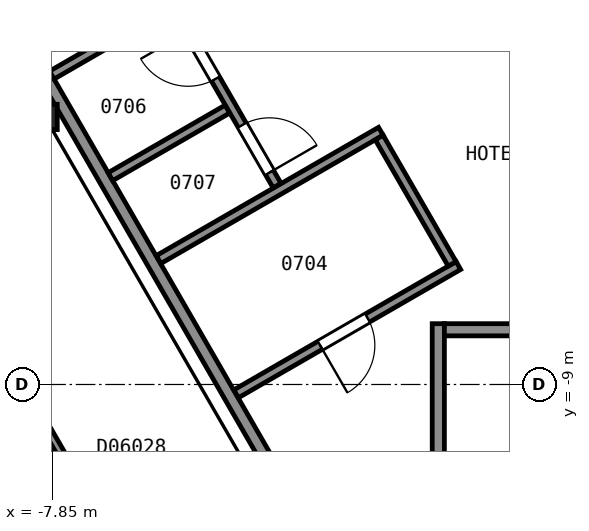
"""IFC4 building model, lengths in metres.
Left out: names, types, materials, properties, quantities, classifications, styles, units other than length and angle.
Written with IfcOpenShell. Run it as: python <this file> out.ifc"""

import sys

from ifc_helpers import new_model, si_unit, direction, frame, frame_2d, origin, origin_2d, place, context, subcontext, project, spatial, rectangle, i_section, extrude, element, fill, save


model = new_model("IFC4")
c1 = context("Model", 3, precision=1e-05, world=origin(), true_north=direction((0.0, 1.0)))
c2 = subcontext(c1, "Body", "Model", "MODEL_VIEW")
j1 = project(units=[si_unit("LENGTHUNIT", "METRE"), si_unit("PLANEANGLEUNIT", "RADIAN")], contexts=[c1])
p1 = place(None, origin())
s1 = spatial("IfcSite", under=j1, at=p1, CompositionType="ELEMENT")
p2 = place(p1, origin())
s2 = spatial("IfcBuilding", under=s1, at=p2, CompositionType="ELEMENT")
p3 = place(p2, frame((0.0, 0.0, 40.4)))
s3 = spatial("IfcBuildingStorey", under=s2, at=p3, CompositionType="ELEMENT", Elevation=40.4)
p4 = place(p3, frame((-7.97, -4.6, 0.0), z_axis=(0.0, 0.0, 1.0), x_axis=(1.0, 0.0, 0.0)))
e1 = element("IfcColumn", 1, at=p4, inside=s3, PredefinedType="COLUMN", context=c2, shape_type="SweptSolid", body=[
    extrude(i_section(OverallWidth=0.406, OverallDepth=0.417, WebThickness=0.03, FlangeThickness=0.048, FilletRadius=0.015, at=origin_2d()), origin(), (0.0, 0.0, 1.0), 3.6),
])
p5 = place(p3, frame((-1.5, -8.0, 0.0), z_axis=(0.0, 0.0, 1.0), x_axis=(0.0, -1.0, 0.0)))
e2 = element("IfcWall", 2, at=p5, inside=s3, PredefinedType="PARTITIONING", context=c2, shape_type="SweptSolid", body=[
    extrude(rectangle(XDim=12.0, YDim=0.2, at=frame_2d((6.0, 0.0))), origin(), (0.0, 0.0, 1.0), 3.35),
])
p6 = place(p3, frame((-1.4, -8.1, 0.0), z_axis=(0.0, 0.0, 1.0), x_axis=(1.0, 0.0, 0.0)))
e3 = element("IfcWall", 3, at=p6, inside=s3, PredefinedType="PARTITIONING", context=c2, shape_type="SweptSolid", body=[
    extrude(rectangle(XDim=2.8, YDim=0.2, at=frame_2d((1.4, 0.0))), origin(), (0.0, 0.0, 1.0), 3.35),
])
p7 = place(p3, frame((-13.664, 5.946, 0.0), z_axis=(0.0, 0.0, 1.0), x_axis=(0.499994327219, -0.866028678941, 0.0)))
e4 = element("IfcWall", 4, at=p7, inside=s3, PredefinedType="PARTITIONING", context=c2, shape_type="SweptSolid", body=[
    extrude(rectangle(XDim=23.968, YDim=0.2, at=frame_2d((11.984, 0.0))), origin(), (0.0, 0.0, 1.0), 3.35),
])
p8 = place(p3, frame((-7.856, -3.912, 0.0), z_axis=(0.0, 0.0, 1.0), x_axis=(0.865971748, 0.500092923031, 0.0)))
e5 = element("IfcWall", 5, at=p8, inside=s3, PredefinedType="PARTITIONING", context=c2, shape_type="SweptSolid", body=[
    extrude(rectangle(XDim=2.225, YDim=0.15, at=frame_2d((1.112, 0.0))), origin(), (0.0, 0.0, 1.0), 3.35),
])
p9 = place(p3, frame((-6.892, -5.582, 0.0), z_axis=(0.0, 0.0, 1.0), x_axis=(0.865944298464, 0.500140452231, 0.0)))
e6 = element("IfcWall", 6, at=p9, inside=s3, PredefinedType="PARTITIONING", context=c2, shape_type="SweptSolid", body=[
    extrude(rectangle(XDim=2.224, YDim=0.15, at=frame_2d((1.112, 0.0))), origin(), (0.0, 0.0, 1.0), 3.35),
])
p10 = place(p3, frame((-6.1, -6.946, 0.0), z_axis=(0.0, 0.0, 1.0), x_axis=(0.866038200431, 0.499977834903, 0.0)))
e7 = element("IfcWall", 7, at=p10, inside=s3, PredefinedType="PARTITIONING", context=c2, shape_type="SweptSolid", body=[
    extrude(rectangle(XDim=4.22, YDim=0.15, at=frame_2d((2.11, 0.0))), origin(), (0.0, 0.0, 1.0), 3.35),
])
p11 = place(p3, frame((-4.152, -5.729, 0.0), z_axis=(0.0, 0.0, 1.0), x_axis=(-0.500024287448, 0.866011380966, 0.0)))
e8 = element("IfcWall", 8, at=p11, inside=s3, PredefinedType="PARTITIONING", context=c2, shape_type="SweptSolid", body=[
    extrude(rectangle(XDim=3.501, YDim=0.15, at=frame_2d((1.75, 0.0))), origin(), (0.0, 0.0, 1.0), 3.35),
])
p12 = place(p11, frame((2.026, 0.0, 0.0)))
e9 = element("IfcOpeningElement", 9, at=p12, cuts=e8, PredefinedType="OPENING", context=c2, shape_type="SweptSolid", body=[
    extrude(rectangle(XDim=0.9, YDim=2.1, at=frame_2d((0.45, 1.05))), frame((0.0, 0.085, 0.0), z_axis=(0.0, -1.0, 0.0), x_axis=(1.0, 0.0, 0.0)), (0.0, 0.0, 1.0), 0.17),
])
p13 = place(p11, frame((0.248, 0.0, 0.0)))
e10 = element("IfcOpeningElement", 10, at=p13, cuts=e8, PredefinedType="OPENING", context=c2, shape_type="SweptSolid", body=[
    extrude(rectangle(XDim=0.9, YDim=2.1, at=frame_2d((0.45, 1.05))), frame((0.0, 0.085, 0.0), z_axis=(0.0, -1.0, 0.0), x_axis=(1.0, 0.0, 0.0)), (0.0, 0.0, 1.0), 0.17),
])
p14 = place(p3, frame((-4.825, -9.154, 0.0), z_axis=(0.0, 0.0, 1.0), x_axis=(0.866023738697, 0.500002884005, 0.0)))
e11 = element("IfcWall", 11, at=p14, inside=s3, PredefinedType="PARTITIONING", context=c2, shape_type="SweptSolid", body=[
    extrude(rectangle(XDim=4.22, YDim=0.15, at=frame_2d((2.11, 0.0))), origin(), (0.0, 0.0, 1.0), 3.35),
])
p15 = place(p14, frame((1.595, 0.0, 0.0)))
e12 = element("IfcOpeningElement", 12, at=p15, cuts=e11, PredefinedType="OPENING", context=c2, shape_type="SweptSolid", body=[
    extrude(rectangle(XDim=0.9, YDim=2.1, at=frame_2d((0.45, 1.05))), frame((0.0, 0.085, 0.0), z_axis=(0.0, -1.0, 0.0), x_axis=(1.0, 0.0, 0.0)), (0.0, 0.0, 1.0), 0.17),
])
p16 = place(p3, frame((-2.472, -4.938, 0.0), z_axis=(0.0, 0.0, 1.0), x_axis=(0.500045362686, -0.865999212041, 0.0)))
e13 = element("IfcWall", 13, at=p16, inside=s3, PredefinedType="PARTITIONING", context=c2, shape_type="SweptSolid", body=[
    extrude(rectangle(XDim=2.4, YDim=0.15, at=frame_2d((1.2, 0.0))), origin(), (0.0, 0.0, 1.0), 3.35),
])
p17 = place(p3, frame((-3.766, -16.958, 0.0), z_axis=(0.0, 0.0, 1.0), x_axis=(-0.500024758804, 0.866011108811, 0.0)))
e14 = element("IfcWall", 14, at=p17, inside=s3, PredefinedType="PARTITIONING", context=c2, shape_type="SweptSolid", body=[
    extrude(rectangle(XDim=26.402, YDim=0.125, at=frame_2d((13.201, 0.0))), origin(), (0.0, 0.0, 1.0), 2.613),
])
p18 = place(p17, frame((25.139, 0.0, 0.0)))
e15 = element("IfcOpeningElement", 15, at=p18, cuts=e14, PredefinedType="OPENING", context=c2, shape_type="SweptSolid", body=[
    extrude(rectangle(XDim=0.9, YDim=2.1, at=frame_2d((0.45, 1.05))), frame((0.0, 0.073, 0.0), z_axis=(0.0, -1.0, 0.0), x_axis=(1.0, 0.0, 0.0)), (0.0, 0.0, 1.0), 0.145),
])
p19 = place(p17, frame((22.963, 0.0, 0.0)))
e16 = element("IfcOpeningElement", 16, at=p19, cuts=e14, PredefinedType="OPENING", context=c2, shape_type="SweptSolid", body=[
    extrude(rectangle(XDim=1.0, YDim=2.1, at=frame_2d((0.5, 1.05))), frame((0.0, 0.073, 0.0), z_axis=(0.0, -1.0, 0.0), x_axis=(1.0, 0.0, 0.0)), (0.0, 0.0, 1.0), 0.145),
])
p20 = place(p17, frame((15.228, 0.0, 0.0)))
e17 = element("IfcOpeningElement", 17, at=p20, cuts=e14, PredefinedType="OPENING", context=c2, shape_type="SweptSolid", body=[
    extrude(rectangle(XDim=0.9, YDim=2.1, at=frame_2d((0.45, 1.05))), frame((0.0, 0.073, 0.0), z_axis=(0.0, -1.0, 0.0), x_axis=(1.0, 0.0, 0.0)), (0.0, 0.0, 1.0), 0.145),
])
p21 = place(p17, frame((12.702, 0.0, 0.0)))
e18 = element("IfcOpeningElement", 18, at=p21, cuts=e14, PredefinedType="OPENING", context=c2, shape_type="SweptSolid", body=[
    extrude(rectangle(XDim=0.9, YDim=2.1, at=frame_2d((0.45, 1.05))), frame((0.0, 0.073, 0.0), z_axis=(0.0, -1.0, 0.0), x_axis=(1.0, 0.0, 0.0)), (0.0, 0.0, 1.0), 0.145),
])
p22 = place(p17, frame((5.624, 0.0, 0.0)))
e19 = element("IfcOpeningElement", 19, at=p22, cuts=e14, PredefinedType="OPENING", context=c2, shape_type="SweptSolid", body=[
    extrude(rectangle(XDim=0.9, YDim=2.1, at=frame_2d((0.45, 1.05))), frame((0.0, 0.073, 0.0), z_axis=(0.0, -1.0, 0.0), x_axis=(1.0, 0.0, 0.0)), (0.0, 0.0, 1.0), 0.145),
])
p23 = place(p17, frame((2.843, 0.0, 0.0)))
e20 = element("IfcOpeningElement", 20, at=p23, cuts=e14, PredefinedType="OPENING", context=c2, shape_type="SweptSolid", body=[
    extrude(rectangle(XDim=0.9, YDim=2.1, at=frame_2d((0.45, 1.05))), frame((0.0, 0.073, 0.0), z_axis=(0.0, -1.0, 0.0), x_axis=(1.0, 0.0, 0.0)), (0.0, 0.0, 1.0), 0.145),
])
p24 = place(p12, origin())
e21 = element("IfcDoor", 21, at=p24, inside=s3, OperationType="SINGLE_SWING_RIGHT", PredefinedType="DOOR", context=c2, shape_type="SweptSolid", body=[
    extrude(rectangle(XDim=0.9, YDim=2.1, at=frame_2d((0.45, 1.05))), frame((0.0, 0.025, 0.0), z_axis=(0.0, -1.0, 0.0), x_axis=(1.0, 0.0, 0.0)), (0.0, 0.0, 1.0), 0.05),
])
fill(e9, e21)
p25 = place(p13, origin())
e22 = element("IfcDoor", 22, at=p25, inside=s3, OperationType="SINGLE_SWING_LEFT", PredefinedType="DOOR", context=c2, shape_type="SweptSolid", body=[
    extrude(rectangle(XDim=0.9, YDim=2.1, at=frame_2d((0.45, 1.05))), frame((0.0, 0.025, 0.0), z_axis=(0.0, -1.0, 0.0), x_axis=(1.0, 0.0, 0.0)), (0.0, 0.0, 1.0), 0.05),
])
fill(e10, e22)
p26 = place(p15, origin())
e23 = element("IfcDoor", 23, at=p26, inside=s3, OperationType="SINGLE_SWING_LEFT", PredefinedType="DOOR", context=c2, shape_type="SweptSolid", body=[
    extrude(rectangle(XDim=0.9, YDim=2.1, at=frame_2d((0.45, 1.05))), frame((0.0, 0.025, 0.0), z_axis=(0.0, -1.0, 0.0), x_axis=(1.0, 0.0, 0.0)), (0.0, 0.0, 1.0), 0.05),
])
fill(e12, e23)
save(model, sys.argv[1])
